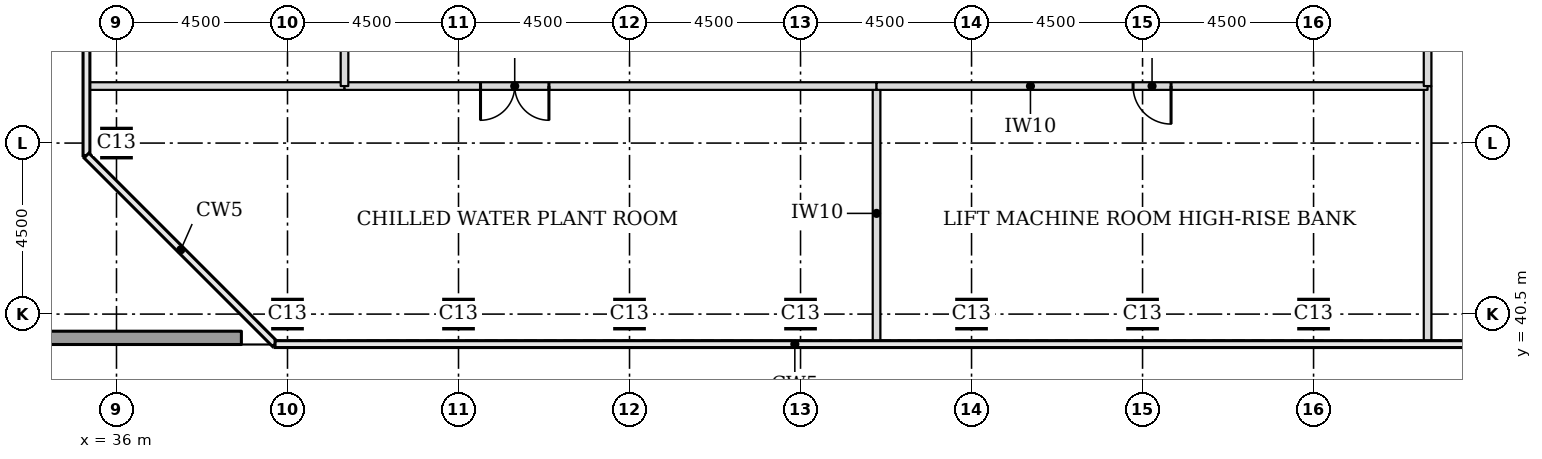
"""IFC4 building model, lengths in metres.
Left out: names, types, materials, properties, quantities, classifications, styles, units other than length and angle.
Written with IfcOpenShell. Run it as: python <this file> out.ifc"""

import sys

from ifc_helpers import new_model, si_unit, direction, frame, frame_2d, origin, origin_2d, place, context, subcontext, project, spatial, rectangle, extrude, element, fill, save


model = new_model("IFC4")
c1 = context("Model", 3, precision=1e-05, world=origin(), true_north=direction((0.0, 1.0)))
c2 = subcontext(c1, "Body", "Model", "MODEL_VIEW")
j1 = project(units=[si_unit("LENGTHUNIT", "METRE"), si_unit("PLANEANGLEUNIT", "RADIAN")], contexts=[c1])
p1 = place(None, origin())
s1 = spatial("IfcSite", under=j1, at=p1, CompositionType="ELEMENT")
p2 = place(p1, origin())
s2 = spatial("IfcBuilding", under=s1, at=p2, CompositionType="ELEMENT")
p3 = place(p2, frame((0.0, 0.0, 263.7)))
s3 = spatial("IfcBuildingStorey", under=s2, at=p3, CompositionType="ELEMENT", Elevation=263.7)
for number, where, z_axis, x_axis in (
    (1, (40.5, 40.5, 0.0), (0.0, 0.0, 1.0), (1.0, 0.0, 0.0)),
    (2, (45.0, 40.5, 0.0), (0.0, 0.0, 1.0), (1.0, 0.0, 0.0)),
    (3, (49.5, 40.5, 0.0), (0.0, 0.0, 1.0), (1.0, 0.0, 0.0)),
    (4, (54.0, 40.5, 0.0), (0.0, 0.0, 1.0), (1.0, 0.0, 0.0)),
    (5, (58.5, 40.5, 0.0), (0.0, 0.0, 1.0), (1.0, 0.0, 0.0)),
    (6, (63.0, 40.5, 0.0), (0.0, 0.0, 1.0), (1.0, 0.0, 0.0)),
    (7, (67.5, 40.5, 0.0), (0.0, 0.0, 1.0), (1.0, 0.0, 0.0)),
    (8, (36.0, 45.0, 0.0), (0.0, 0.0, 1.0), (1.0, 0.0, 0.0)),
):
    element("IfcColumn", number, at=place(p3, frame(where, z_axis=z_axis, x_axis=x_axis)), inside=s3, PredefinedType="COLUMN", context=c2, shape_type="SweptSolid", body=[
        extrude(rectangle(XDim=0.7, YDim=0.7, at=origin_2d()), origin(), (0.0, 0.0, 1.0), 5.0),
    ])
p4 = place(p3, frame((39.287, 39.875, 0.0), z_axis=(0.0, 0.0, 1.0), x_axis=(-1.0, 0.0, 0.0)))
e9 = element("IfcWall", 9, at=p4, inside=s3, PredefinedType="PARAPET", context=c2, shape_type="SweptSolid", body=[
    extrude(rectangle(XDim=21.545, YDim=0.35, at=frame_2d((10.773, 0.0))), origin(), (0.0, 0.0, 1.0), 1.1),
])
for number, where, z_axis, x_axis in (
    (10, (56.0, 39.8, 0.0), (0.0, 0.0, 1.0), (0.0, 1.0, 0.0)),
    (11, (70.5, 39.8, 0.0), (0.0, 0.0, 1.0), (0.0, 1.0, 0.0)),
    (12, (35.3, 46.5, 0.0), (0.0, 0.0, 1.0), (1.0, 0.0, 0.0)),
):
    element("IfcWall", number, at=place(p3, frame(where, z_axis=z_axis, x_axis=x_axis)), inside=s3, PredefinedType="PARTITIONING", context=c2, shape_type="SweptSolid", body=[
        extrude(rectangle(XDim=6.7, YDim=0.2, at=frame_2d((3.35, 0.0))), origin(), (0.0, 0.0, 1.0), 4.75),
    ])
p5 = place(p3, frame((42.0, 46.5, 0.0), z_axis=(0.0, 0.0, 1.0), x_axis=(1.0, 0.0, 0.0)))
e13 = element("IfcWall", 13, at=p5, inside=s3, PredefinedType="PARTITIONING", context=c2, shape_type="SweptSolid", body=[
    extrude(rectangle(XDim=14.0, YDim=0.2, at=frame_2d((7.0, 0.0))), origin(), (0.0, 0.0, 1.0), 4.75),
])
p6 = place(p5, frame((3.579, 0.0, 0.0)))
e14 = element("IfcOpeningElement", 14, at=p6, cuts=e13, PredefinedType="OPENING", context=c2, shape_type="SweptSolid", body=[
    extrude(rectangle(XDim=1.8, YDim=2.1, at=frame_2d((0.9, 1.05))), frame((0.0, 0.11, 0.0), z_axis=(0.0, -1.0, 0.0), x_axis=(1.0, 0.0, 0.0)), (0.0, 0.0, 1.0), 0.22),
])
p7 = place(p3, frame((42.0, 46.5, 0.0), z_axis=(0.0, 0.0, 1.0), x_axis=(0.0, 1.0, 0.0)))
e15 = element("IfcWall", 15, at=p7, inside=s3, PredefinedType="PARTITIONING", context=c2, shape_type="SweptSolid", body=[
    extrude(rectangle(XDim=15.5, YDim=0.2, at=frame_2d((7.75, 0.0))), origin(), (0.0, 0.0, 1.0), 4.75),
])
p8 = place(p7, frame((7.25, 0.0, 0.0)))
e16 = element("IfcOpeningElement", 16, at=p8, cuts=e15, PredefinedType="OPENING", context=c2, shape_type="SweptSolid", body=[
    extrude(rectangle(XDim=1.0, YDim=2.1, at=frame_2d((0.5, 1.05))), frame((0.0, 0.11, 0.0), z_axis=(0.0, -1.0, 0.0), x_axis=(1.0, 0.0, 0.0)), (0.0, 0.0, 1.0), 0.22),
])
p9 = place(p3, frame((56.0, 46.5, 0.0), z_axis=(0.0, 0.0, 1.0), x_axis=(1.0, 0.0, 0.0)))
e17 = element("IfcWall", 17, at=p9, inside=s3, PredefinedType="PARTITIONING", context=c2, shape_type="SweptSolid", body=[
    extrude(rectangle(XDim=14.5, YDim=0.2, at=frame_2d((7.25, 0.0))), origin(), (0.0, 0.0, 1.0), 4.75),
])
p10 = place(p9, frame((6.75, 0.0, 0.0)))
e18 = element("IfcOpeningElement", 18, at=p10, cuts=e17, PredefinedType="OPENING", context=c2, shape_type="SweptSolid", body=[
    extrude(rectangle(XDim=1.0, YDim=2.1, at=frame_2d((0.5, 1.05))), frame((0.0, 0.11, 0.0), z_axis=(0.0, -1.0, 0.0), x_axis=(1.0, 0.0, 0.0)), (0.0, 0.0, 1.0), 0.22),
])
p11 = place(p3, frame((70.5, 46.5, 0.0), z_axis=(0.0, 0.0, 1.0), x_axis=(0.0, 1.0, 0.0)))
e19 = element("IfcWall", 19, at=p11, inside=s3, PredefinedType="PARTITIONING", context=c2, shape_type="SweptSolid", body=[
    extrude(rectangle(XDim=13.5, YDim=0.2, at=frame_2d((6.75, 0.0))), origin(), (0.0, 0.0, 1.0), 4.75),
])
p12 = place(p11, frame((3.327, 0.0, 0.0)))
e20 = element("IfcOpeningElement", 20, at=p12, cuts=e19, PredefinedType="OPENING", context=c2, shape_type="SweptSolid", body=[
    extrude(rectangle(XDim=1.8, YDim=2.1, at=frame_2d((0.9, 1.05))), frame((0.0, 0.11, 0.0), z_axis=(0.0, -1.0, 0.0), x_axis=(1.0, 0.0, 0.0)), (0.0, 0.0, 1.0), 0.22),
])
p13 = place(p6, frame((1.8, 0.0, 0.0), z_axis=(0.0, 0.0, 1.0), x_axis=(-1.0, 0.0, 0.0)))
e21 = element("IfcDoor", 21, at=p13, inside=s3, OperationType="DOUBLE_DOOR_SINGLE_SWING", PredefinedType="DOOR", context=c2, shape_type="SweptSolid", body=[
    extrude(rectangle(XDim=1.8, YDim=2.1, at=frame_2d((0.9, 1.05))), frame((0.0, 0.025, 0.0), z_axis=(0.0, -1.0, 0.0), x_axis=(1.0, 0.0, 0.0)), (0.0, 0.0, 1.0), 0.05),
])
fill(e14, e21)
p14 = place(p10, frame((1.0, 0.0, 0.0), z_axis=(0.0, 0.0, 1.0), x_axis=(-1.0, 0.0, 0.0)))
e22 = element("IfcDoor", 22, at=p14, inside=s3, OperationType="SINGLE_SWING_LEFT", PredefinedType="DOOR", context=c2, shape_type="SweptSolid", body=[
    extrude(rectangle(XDim=1.0, YDim=2.1, at=frame_2d((0.5, 1.05))), frame((0.0, 0.025, 0.0), z_axis=(0.0, -1.0, 0.0), x_axis=(1.0, 0.0, 0.0)), (0.0, 0.0, 1.0), 0.05),
])
fill(e18, e22)
save(model, sys.argv[1])
